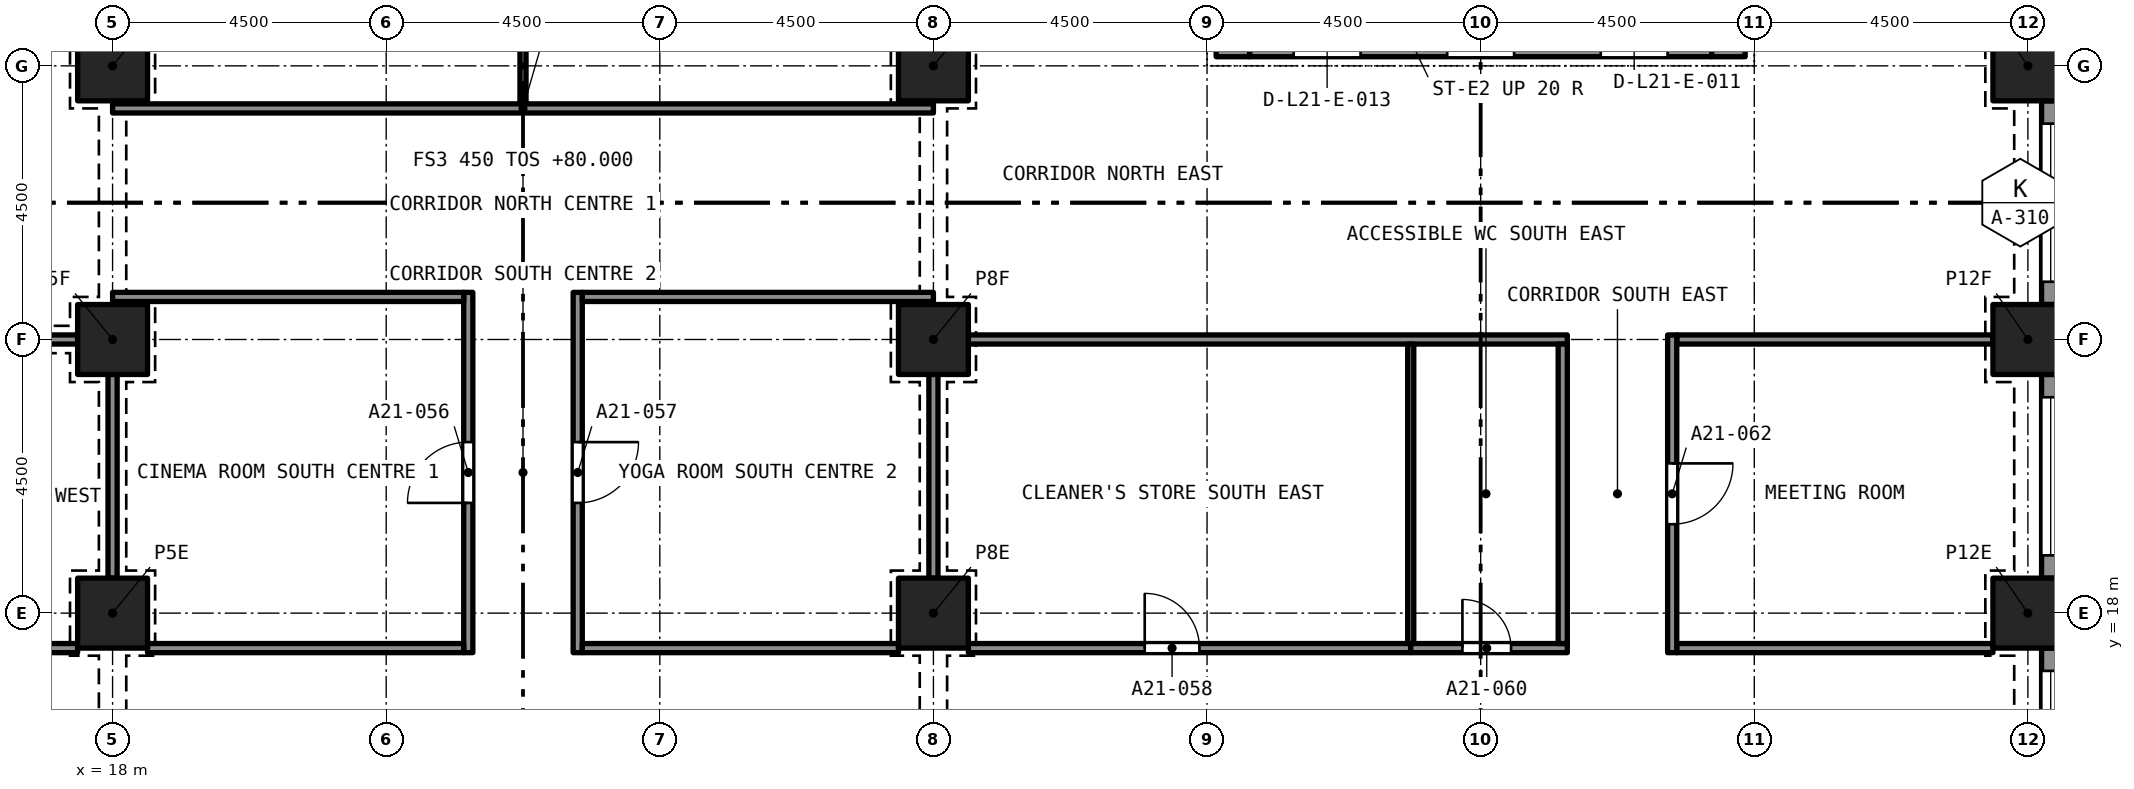
"""IFC4 building model, lengths in metres.
Left out: names, types, materials, properties, quantities, classifications, styles, units other than length and angle.
Written with IfcOpenShell. Run it as: python <this file> out.ifc"""

import sys

from ifc_helpers import new_model, si_unit, direction, frame, frame_2d, origin, origin_2d, place, context, subcontext, project, spatial, rectangle, extrude, element, fill, save


model = new_model("IFC4")
c1 = context("Model", 3, precision=1e-05, world=origin(), true_north=direction((0.0, 1.0)))
c2 = subcontext(c1, "Body", "Model", "MODEL_VIEW")
j1 = project(units=[si_unit("LENGTHUNIT", "METRE"), si_unit("PLANEANGLEUNIT", "RADIAN")], contexts=[c1])
p1 = place(None, origin())
s1 = spatial("IfcSite", under=j1, at=p1, CompositionType="ELEMENT")
p2 = place(p1, origin())
s2 = spatial("IfcBuilding", under=s1, at=p2, CompositionType="ELEMENT")
p3 = place(p2, frame((0.0, 0.0, 80.0)))
s3 = spatial("IfcBuildingStorey", under=s2, at=p3, CompositionType="ELEMENT", Elevation=80.0)
for number, where, z_axis, x_axis in (
    (1, (18.0, 18.0, 0.0), (0.0, 0.0, 1.0), (1.0, 0.0, 0.0)),
    (2, (31.5, 18.0, 0.0), (0.0, 0.0, 1.0), (1.0, 0.0, 0.0)),
    (3, (49.5, 18.0, 0.0), (0.0, 0.0, 1.0), (1.0, 0.0, 0.0)),
    (4, (18.0, 22.5, 0.0), (0.0, 0.0, 1.0), (1.0, 0.0, 0.0)),
    (5, (31.5, 22.5, 0.0), (0.0, 0.0, 1.0), (1.0, 0.0, 0.0)),
    (6, (49.5, 22.5, 0.0), (0.0, 0.0, 1.0), (1.0, 0.0, 0.0)),
    (7, (18.0, 27.0, 0.0), (0.0, 0.0, 1.0), (1.0, 0.0, 0.0)),
    (8, (31.5, 27.0, 0.0), (0.0, 0.0, 1.0), (1.0, 0.0, 0.0)),
    (9, (49.5, 27.0, 0.0), (0.0, 0.0, 1.0), (1.0, 0.0, 0.0)),
):
    element("IfcColumn", number, at=place(p3, frame(where, z_axis=z_axis, x_axis=x_axis)), inside=s3, PredefinedType="COLUMN", context=c2, shape_type="SweptSolid", body=[
        extrude(rectangle(XDim=1.15, YDim=1.15, at=origin_2d()), origin(), (0.0, 0.0, 1.0), 3.2),
    ])
p4 = place(p3, frame((36.7, 27.425, 0.0), z_axis=(0.0, 0.0, 1.0), x_axis=(1.0, 0.0, 0.0)))
e10 = element("IfcWall", 10, at=p4, inside=s3, PredefinedType="SOLIDWALL", context=c2, shape_type="SweptSolid", body=[
    extrude(rectangle(XDim=7.6, YDim=0.55, at=frame_2d((3.8, 0.0))), origin(), (0.0, 0.0, 1.0), 3.2),
])
p5 = place(p4, frame((5.775, 0.0, 0.0)))
e11 = element("IfcOpeningElement", 11, at=p5, cuts=e10, PredefinedType="OPENING", context=c2, shape_type="SweptSolid", body=[
    extrude(rectangle(XDim=1.1, YDim=2.1, at=frame_2d((0.55, 1.05))), frame((0.0, 0.285, 0.0), z_axis=(0.0, -1.0, 0.0), x_axis=(1.0, 0.0, 0.0)), (0.0, 0.0, 1.0), 0.57),
])
p6 = place(p4, frame((3.25, 0.0, 0.0)))
e12 = element("IfcOpeningElement", 12, at=p6, cuts=e10, PredefinedType="OPENING", context=c2, shape_type="SweptSolid", body=[
    extrude(rectangle(XDim=1.1, YDim=2.1, at=frame_2d((0.55, 1.05))), frame((0.0, 0.285, 0.0), z_axis=(0.0, -1.0, 0.0), x_axis=(1.0, 0.0, 0.0)), (0.0, 0.0, 1.0), 0.57),
])
p7 = place(p4, frame((0.725, 0.0, 0.0)))
e13 = element("IfcOpeningElement", 13, at=p7, cuts=e10, PredefinedType="OPENING", context=c2, shape_type="SweptSolid", body=[
    extrude(rectangle(XDim=1.1, YDim=2.1, at=frame_2d((0.55, 1.05))), frame((0.0, 0.285, 0.0), z_axis=(0.0, -1.0, 0.0), x_axis=(1.0, 0.0, 0.0)), (0.0, 0.0, 1.0), 0.57),
])
p8 = place(p3, frame((36.425, 27.15, 0.0), z_axis=(0.0, 0.0, 1.0), x_axis=(0.0, 1.0, 0.0)))
e14 = element("IfcWall", 14, at=p8, inside=s3, PredefinedType="SOLIDWALL", context=c2, shape_type="SweptSolid", body=[
    extrude(rectangle(XDim=13.2, YDim=0.55, at=frame_2d((6.6, 0.0))), origin(), (0.0, 0.0, 1.0), 3.2),
])
p9 = place(p8, frame((8.8, 0.0, 0.0)))
e15 = element("IfcOpeningElement", 15, at=p9, cuts=e14, PredefinedType="OPENING", context=c2, shape_type="SweptSolid", body=[
    extrude(rectangle(XDim=1.2, YDim=2.1, at=frame_2d((0.6, 1.05))), frame((0.0, 0.285, 0.0), z_axis=(0.0, -1.0, 0.0), x_axis=(1.0, 0.0, 0.0)), (0.0, 0.0, 1.0), 0.57),
])
p10 = place(p3, frame((44.575, 27.15, 0.0), z_axis=(0.0, 0.0, 1.0), x_axis=(0.0, 1.0, 0.0)))
e16 = element("IfcWall", 16, at=p10, inside=s3, PredefinedType="SOLIDWALL", context=c2, shape_type="SweptSolid", body=[
    extrude(rectangle(XDim=13.2, YDim=0.55, at=frame_2d((6.6, 0.0))), origin(), (0.0, 0.0, 1.0), 3.2),
])
p11 = place(p10, frame((8.8, 0.0, 0.0)))
e17 = element("IfcOpeningElement", 17, at=p11, cuts=e16, PredefinedType="OPENING", context=c2, shape_type="SweptSolid", body=[
    extrude(rectangle(XDim=1.2, YDim=2.1, at=frame_2d((0.6, 1.05))), frame((0.0, 0.285, 0.0), z_axis=(0.0, -1.0, 0.0), x_axis=(1.0, 0.0, 0.0)), (0.0, 0.0, 1.0), 0.57),
])
p12 = place(p3, frame((49.875, 17.425, 0.0), z_axis=(0.0, 0.0, 1.0), x_axis=(0.0, -1.0, 0.0)))
e18 = element("IfcWall", 18, at=p12, inside=s3, PredefinedType="SOLIDWALL", context=c2, shape_type="SweptSolid", body=[
    extrude(rectangle(XDim=3.35, YDim=0.3, at=frame_2d((1.675, 0.0))), origin(), (0.0, 0.0, 1.0), 3.2),
])
p13 = place(p12, frame((0.375, 0.0, 0.45)))
e19 = element("IfcOpeningElement", 19, at=p13, cuts=e18, PredefinedType="OPENING", context=c2, shape_type="SweptSolid", body=[
    extrude(rectangle(XDim=2.6, YDim=1.95, at=frame_2d((1.3, 0.975))), frame((0.0, 0.16, 0.0), z_axis=(0.0, -1.0, 0.0), x_axis=(1.0, 0.0, 0.0)), (0.0, 0.0, 1.0), 0.32),
])
p14 = place(p3, frame((49.875, 21.925, 0.0), z_axis=(0.0, 0.0, 1.0), x_axis=(0.0, -1.0, 0.0)))
e20 = element("IfcWall", 20, at=p14, inside=s3, PredefinedType="SOLIDWALL", context=c2, shape_type="SweptSolid", body=[
    extrude(rectangle(XDim=3.35, YDim=0.3, at=frame_2d((1.675, 0.0))), origin(), (0.0, 0.0, 1.0), 3.2),
])
p15 = place(p14, frame((0.375, 0.0, 0.45)))
e21 = element("IfcOpeningElement", 21, at=p15, cuts=e20, PredefinedType="OPENING", context=c2, shape_type="SweptSolid", body=[
    extrude(rectangle(XDim=2.6, YDim=1.95, at=frame_2d((1.3, 0.975))), frame((0.0, 0.16, 0.0), z_axis=(0.0, -1.0, 0.0), x_axis=(1.0, 0.0, 0.0)), (0.0, 0.0, 1.0), 0.32),
])
p16 = place(p3, frame((49.875, 26.425, 0.0), z_axis=(0.0, 0.0, 1.0), x_axis=(0.0, -1.0, 0.0)))
e22 = element("IfcWall", 22, at=p16, inside=s3, PredefinedType="SOLIDWALL", context=c2, shape_type="SweptSolid", body=[
    extrude(rectangle(XDim=3.35, YDim=0.3, at=frame_2d((1.675, 0.0))), origin(), (0.0, 0.0, 1.0), 3.2),
])
p17 = place(p16, frame((0.375, 0.0, 0.45)))
e23 = element("IfcOpeningElement", 23, at=p17, cuts=e22, PredefinedType="OPENING", context=c2, shape_type="SweptSolid", body=[
    extrude(rectangle(XDim=2.6, YDim=1.95, at=frame_2d((1.3, 0.975))), frame((0.0, 0.16, 0.0), z_axis=(0.0, -1.0, 0.0), x_axis=(1.0, 0.0, 0.0)), (0.0, 0.0, 1.0), 0.32),
])
p18 = place(p3, frame((23.85, 17.35, 0.0), z_axis=(0.0, 0.0, 1.0), x_axis=(0.0, 1.0, 0.0)))
e24 = element("IfcWall", 24, at=p18, inside=s3, PredefinedType="PARTITIONING", context=c2, shape_type="SweptSolid", body=[
    extrude(rectangle(XDim=5.925, YDim=0.15, at=frame_2d((2.962, 0.0))), origin(), (0.0, 0.0, 1.0), 2.75),
])
p19 = place(p18, frame((2.462, 0.0, 0.0)))
e25 = element("IfcOpeningElement", 25, at=p19, cuts=e24, PredefinedType="OPENING", context=c2, shape_type="SweptSolid", body=[
    extrude(rectangle(XDim=1.0, YDim=2.1, at=frame_2d((0.5, 1.05))), frame((0.0, 0.085, 0.0), z_axis=(0.0, -1.0, 0.0), x_axis=(1.0, 0.0, 0.0)), (0.0, 0.0, 1.0), 0.17),
])
p20 = place(p3, frame((25.65, 23.275, 0.0), z_axis=(0.0, 0.0, 1.0), x_axis=(0.0, -1.0, 0.0)))
e26 = element("IfcWall", 26, at=p20, inside=s3, PredefinedType="PARTITIONING", context=c2, shape_type="SweptSolid", body=[
    extrude(rectangle(XDim=5.925, YDim=0.15, at=frame_2d((2.962, 0.0))), origin(), (0.0, 0.0, 1.0), 2.75),
])
p21 = place(p20, frame((2.462, 0.0, 0.0)))
e27 = element("IfcOpeningElement", 27, at=p21, cuts=e26, PredefinedType="OPENING", context=c2, shape_type="SweptSolid", body=[
    extrude(rectangle(XDim=1.0, YDim=2.1, at=frame_2d((0.5, 1.05))), frame((0.0, 0.085, 0.0), z_axis=(0.0, -1.0, 0.0), x_axis=(1.0, 0.0, 0.0)), (0.0, 0.0, 1.0), 0.17),
])
for number, where, z_axis, x_axis in (
    (28, (18.575, 17.425, 0.0), (0.0, 0.0, 1.0), (1.0, 0.0, 0.0)),
    (29, (25.725, 17.425, 0.0), (0.0, 0.0, 1.0), (1.0, 0.0, 0.0)),
):
    element("IfcWall", number, at=place(p3, frame(where, z_axis=z_axis, x_axis=x_axis)), inside=s3, PredefinedType="PARTITIONING", context=c2, shape_type="SweptSolid", body=[
        extrude(rectangle(XDim=5.2, YDim=0.15, at=frame_2d((2.6, 0.0))), origin(), (0.0, 0.0, 1.0), 2.75),
    ])
p22 = place(p3, frame((32.075, 17.425, 0.0), z_axis=(0.0, 0.0, 1.0), x_axis=(1.0, 0.0, 0.0)))
e30 = element("IfcWall", 30, at=p22, inside=s3, PredefinedType="PARTITIONING", context=c2, shape_type="SweptSolid", body=[
    extrude(rectangle(XDim=7.275, YDim=0.15, at=frame_2d((3.638, 0.0))), origin(), (0.0, 0.0, 1.0), 2.9),
])
p23 = place(p22, frame((2.9, 0.0, 0.0)))
e31 = element("IfcOpeningElement", 31, at=p23, cuts=e30, PredefinedType="OPENING", context=c2, shape_type="SweptSolid", body=[
    extrude(rectangle(XDim=0.9, YDim=2.1, at=frame_2d((0.45, 1.05))), frame((0.0, 0.085, 0.0), z_axis=(0.0, -1.0, 0.0), x_axis=(1.0, 0.0, 0.0)), (0.0, 0.0, 1.0), 0.17),
])
p24 = place(p3, frame((10.15, 17.425, 0.0), z_axis=(0.0, 0.0, 1.0), x_axis=(1.0, 0.0, 0.0)))
e32 = element("IfcWall", 32, at=p24, inside=s3, PredefinedType="PARTITIONING", context=c2, shape_type="SweptSolid", body=[
    extrude(rectangle(XDim=7.275, YDim=0.15, at=frame_2d((3.638, 0.0))), origin(), (0.0, 0.0, 1.0), 2.9),
])
p25 = place(p24, frame((3.475, 0.0, 0.0)))
e33 = element("IfcOpeningElement", 33, at=p25, cuts=e32, PredefinedType="OPENING", context=c2, shape_type="SweptSolid", body=[
    extrude(rectangle(XDim=0.9, YDim=2.1, at=frame_2d((0.45, 1.05))), frame((0.0, 0.085, 0.0), z_axis=(0.0, -1.0, 0.0), x_axis=(1.0, 0.0, 0.0)), (0.0, 0.0, 1.0), 0.17),
])
p26 = place(p3, frame((39.35, 17.425, 0.0), z_axis=(0.0, 0.0, 1.0), x_axis=(1.0, 0.0, 0.0)))
e34 = element("IfcWall", 34, at=p26, inside=s3, PredefinedType="PARTITIONING", context=c2, shape_type="SweptSolid", body=[
    extrude(rectangle(XDim=2.575, YDim=0.15, at=frame_2d((1.288, 0.0))), origin(), (0.0, 0.0, 1.0), 2.9),
])
p27 = place(p26, frame((0.85, 0.0, 0.0)))
e35 = element("IfcOpeningElement", 35, at=p27, cuts=e34, PredefinedType="OPENING", context=c2, shape_type="SweptSolid", body=[
    extrude(rectangle(XDim=0.8, YDim=2.1, at=frame_2d((0.4, 1.05))), frame((0.0, 0.085, 0.0), z_axis=(0.0, -1.0, 0.0), x_axis=(1.0, 0.0, 0.0)), (0.0, 0.0, 1.0), 0.17),
])
p28 = place(p3, frame((43.725, 17.425, 0.0), z_axis=(0.0, 0.0, 1.0), x_axis=(1.0, 0.0, 0.0)))
e36 = element("IfcWall", 36, at=p28, inside=s3, PredefinedType="PARTITIONING", context=c2, shape_type="SweptSolid", body=[
    extrude(rectangle(XDim=5.2, YDim=0.15, at=frame_2d((2.6, 0.0))), origin(), (0.0, 0.0, 1.0), 2.9),
])
p29 = place(p3, frame((24.75, 26.375, 0.0), z_axis=(0.0, 0.0, 1.0), x_axis=(0.0, 1.0, 0.0)))
e37 = element("IfcWall", 37, at=p29, inside=s3, PredefinedType="PARTITIONING", context=c2, shape_type="SweptSolid", body=[
    extrude(rectangle(XDim=10.125, YDim=0.1, at=frame_2d((5.062, 0.0))), origin(), (0.0, 0.0, 1.0), 2.75),
])
p30 = place(p3, frame((18.0, 26.3, 0.0), z_axis=(0.0, 0.0, 1.0), x_axis=(1.0, 0.0, 0.0)))
e38 = element("IfcWall", 38, at=p30, inside=s3, PredefinedType="PARTITIONING", context=c2, shape_type="SweptSolid", body=[
    extrude(rectangle(XDim=13.5, YDim=0.15, at=frame_2d((6.75, 0.0))), origin(), (0.0, 0.0, 1.0), 2.38),
])
p31 = place(p3, frame((18.0, 23.2, 0.0), z_axis=(0.0, 0.0, 1.0), x_axis=(1.0, 0.0, 0.0)))
e39 = element("IfcWall", 39, at=p31, inside=s3, PredefinedType="PARTITIONING", context=c2, shape_type="SweptSolid", body=[
    extrude(rectangle(XDim=5.775, YDim=0.15, at=frame_2d((2.887, 0.0))), origin(), (0.0, 0.0, 1.0), 2.75),
])
p32 = place(p3, frame((18.0, 18.575, 0.0), z_axis=(0.0, 0.0, 1.0), x_axis=(0.0, 1.0, 0.0)))
e40 = element("IfcWall", 40, at=p32, inside=s3, PredefinedType="PARTITIONING", context=c2, shape_type="SweptSolid", body=[
    extrude(rectangle(XDim=3.35, YDim=0.15, at=frame_2d((1.675, 0.0))), origin(), (0.0, 0.0, 1.0), 2.38),
])
p33 = place(p3, frame((25.725, 23.2, 0.0), z_axis=(0.0, 0.0, 1.0), x_axis=(1.0, 0.0, 0.0)))
e41 = element("IfcWall", 41, at=p33, inside=s3, PredefinedType="PARTITIONING", context=c2, shape_type="SweptSolid", body=[
    extrude(rectangle(XDim=5.775, YDim=0.15, at=frame_2d((2.887, 0.0))), origin(), (0.0, 0.0, 1.0), 2.75),
])
p34 = place(p3, frame((31.5, 18.575, 0.0), z_axis=(0.0, 0.0, 1.0), x_axis=(0.0, 1.0, 0.0)))
e42 = element("IfcWall", 42, at=p34, inside=s3, PredefinedType="PARTITIONING", context=c2, shape_type="SweptSolid", body=[
    extrude(rectangle(XDim=3.35, YDim=0.15, at=frame_2d((1.675, 0.0))), origin(), (0.0, 0.0, 1.0), 2.38),
])
p35 = place(p3, frame((32.075, 22.5, 0.0), z_axis=(0.0, 0.0, 1.0), x_axis=(1.0, 0.0, 0.0)))
e43 = element("IfcWall", 43, at=p35, inside=s3, PredefinedType="PARTITIONING", context=c2, shape_type="SweptSolid", body=[
    extrude(rectangle(XDim=9.85, YDim=0.15, at=frame_2d((4.925, 0.0))), origin(), (0.0, 0.0, 1.0), 2.9),
])
p36 = place(p3, frame((43.725, 22.5, 0.0), z_axis=(0.0, 0.0, 1.0), x_axis=(1.0, 0.0, 0.0)))
e44 = element("IfcWall", 44, at=p36, inside=s3, PredefinedType="PARTITIONING", context=c2, shape_type="SweptSolid", body=[
    extrude(rectangle(XDim=5.2, YDim=0.15, at=frame_2d((2.6, 0.0))), origin(), (0.0, 0.0, 1.0), 2.9),
])
p37 = place(p3, frame((14.075, 22.5, 0.0), z_axis=(0.0, 0.0, 1.0), x_axis=(1.0, 0.0, 0.0)))
e45 = element("IfcWall", 45, at=p37, inside=s3, PredefinedType="PARTITIONING", context=c2, shape_type="SweptSolid", body=[
    extrude(rectangle(XDim=3.35, YDim=0.15, at=frame_2d((1.675, 0.0))), origin(), (0.0, 0.0, 1.0), 2.38),
])
p38 = place(p3, frame((41.85, 17.5, 0.0), z_axis=(0.0, 0.0, 1.0), x_axis=(0.0, 1.0, 0.0)))
e46 = element("IfcWall", 46, at=p38, inside=s3, PredefinedType="PARTITIONING", context=c2, shape_type="SweptSolid", body=[
    extrude(rectangle(XDim=4.925, YDim=0.15, at=frame_2d((2.462, 0.0))), origin(), (0.0, 0.0, 1.0), 2.9),
])
p39 = place(p3, frame((43.65, 22.575, 0.0), z_axis=(0.0, 0.0, 1.0), x_axis=(0.0, -1.0, 0.0)))
e47 = element("IfcWall", 47, at=p39, inside=s3, PredefinedType="PARTITIONING", context=c2, shape_type="SweptSolid", body=[
    extrude(rectangle(XDim=5.225, YDim=0.15, at=frame_2d((2.612, 0.0))), origin(), (0.0, 0.0, 1.0), 2.9),
])
p40 = place(p39, frame((2.113, 0.0, 0.0)))
e48 = element("IfcOpeningElement", 48, at=p40, cuts=e47, PredefinedType="OPENING", context=c2, shape_type="SweptSolid", body=[
    extrude(rectangle(XDim=1.0, YDim=2.1, at=frame_2d((0.5, 1.05))), frame((0.0, 0.085, 0.0), z_axis=(0.0, -1.0, 0.0), x_axis=(1.0, 0.0, 0.0)), (0.0, 0.0, 1.0), 0.17),
])
p41 = place(p3, frame((39.35, 17.5, 0.0), z_axis=(0.0, 0.0, 1.0), x_axis=(0.0, 1.0, 0.0)))
e49 = element("IfcWall", 49, at=p41, inside=s3, PredefinedType="PARTITIONING", context=c2, shape_type="SweptSolid", body=[
    extrude(rectangle(XDim=4.925, YDim=0.1, at=frame_2d((2.462, 0.0))), origin(), (0.0, 0.0, 1.0), 2.9),
])
p42 = place(p13, origin())
e50 = element("IfcWindow", 50, at=p42, inside=s3, PartitioningType="SINGLE_PANEL", PredefinedType="WINDOW", context=c2, shape_type="SweptSolid", body=[
    extrude(rectangle(XDim=2.6, YDim=1.95, at=frame_2d((1.3, 0.975))), frame((0.0, 0.03, 0.0), z_axis=(0.0, -1.0, 0.0), x_axis=(1.0, 0.0, 0.0)), (0.0, 0.0, 1.0), 0.06),
])
fill(e19, e50)
p43 = place(p15, origin())
e51 = element("IfcWindow", 51, at=p43, inside=s3, PartitioningType="SINGLE_PANEL", PredefinedType="WINDOW", context=c2, shape_type="SweptSolid", body=[
    extrude(rectangle(XDim=2.6, YDim=1.95, at=frame_2d((1.3, 0.975))), frame((0.0, 0.03, 0.0), z_axis=(0.0, -1.0, 0.0), x_axis=(1.0, 0.0, 0.0)), (0.0, 0.0, 1.0), 0.06),
])
fill(e21, e51)
p44 = place(p17, origin())
e52 = element("IfcWindow", 52, at=p44, inside=s3, PartitioningType="SINGLE_PANEL", PredefinedType="WINDOW", context=c2, shape_type="SweptSolid", body=[
    extrude(rectangle(XDim=2.6, YDim=1.95, at=frame_2d((1.3, 0.975))), frame((0.0, 0.03, 0.0), z_axis=(0.0, -1.0, 0.0), x_axis=(1.0, 0.0, 0.0)), (0.0, 0.0, 1.0), 0.06),
])
fill(e23, e52)
p45 = place(p19, origin())
e53 = element("IfcDoor", 53, at=p45, inside=s3, OperationType="SINGLE_SWING_RIGHT", PredefinedType="DOOR", context=c2, shape_type="SweptSolid", body=[
    extrude(rectangle(XDim=1.0, YDim=2.1, at=frame_2d((0.5, 1.05))), frame((0.0, 0.025, 0.0), z_axis=(0.0, -1.0, 0.0), x_axis=(1.0, 0.0, 0.0)), (0.0, 0.0, 1.0), 0.05),
])
fill(e25, e53)
p46 = place(p21, origin())
e54 = element("IfcDoor", 54, at=p46, inside=s3, OperationType="SINGLE_SWING_RIGHT", PredefinedType="DOOR", context=c2, shape_type="SweptSolid", body=[
    extrude(rectangle(XDim=1.0, YDim=2.1, at=frame_2d((0.5, 1.05))), frame((0.0, 0.025, 0.0), z_axis=(0.0, -1.0, 0.0), x_axis=(1.0, 0.0, 0.0)), (0.0, 0.0, 1.0), 0.05),
])
fill(e27, e54)
p47 = place(p23, origin())
e55 = element("IfcDoor", 55, at=p47, inside=s3, OperationType="SINGLE_SWING_LEFT", PredefinedType="DOOR", context=c2, shape_type="SweptSolid", body=[
    extrude(rectangle(XDim=0.9, YDim=2.1, at=frame_2d((0.45, 1.05))), frame((0.0, 0.025, 0.0), z_axis=(0.0, -1.0, 0.0), x_axis=(1.0, 0.0, 0.0)), (0.0, 0.0, 1.0), 0.05),
])
fill(e31, e55)
p48 = place(p27, origin())
e56 = element("IfcDoor", 56, at=p48, inside=s3, OperationType="SINGLE_SWING_LEFT", PredefinedType="DOOR", context=c2, shape_type="SweptSolid", body=[
    extrude(rectangle(XDim=0.8, YDim=2.1, at=frame_2d((0.4, 1.05))), frame((0.0, 0.025, 0.0), z_axis=(0.0, -1.0, 0.0), x_axis=(1.0, 0.0, 0.0)), (0.0, 0.0, 1.0), 0.05),
])
fill(e35, e56)
p49 = place(p40, origin())
e57 = element("IfcDoor", 57, at=p49, inside=s3, OperationType="SINGLE_SWING_RIGHT", PredefinedType="DOOR", context=c2, shape_type="SweptSolid", body=[
    extrude(rectangle(XDim=1.0, YDim=2.1, at=frame_2d((0.5, 1.05))), frame((0.0, 0.025, 0.0), z_axis=(0.0, -1.0, 0.0), x_axis=(1.0, 0.0, 0.0)), (0.0, 0.0, 1.0), 0.05),
])
fill(e48, e57)
save(model, sys.argv[1])
